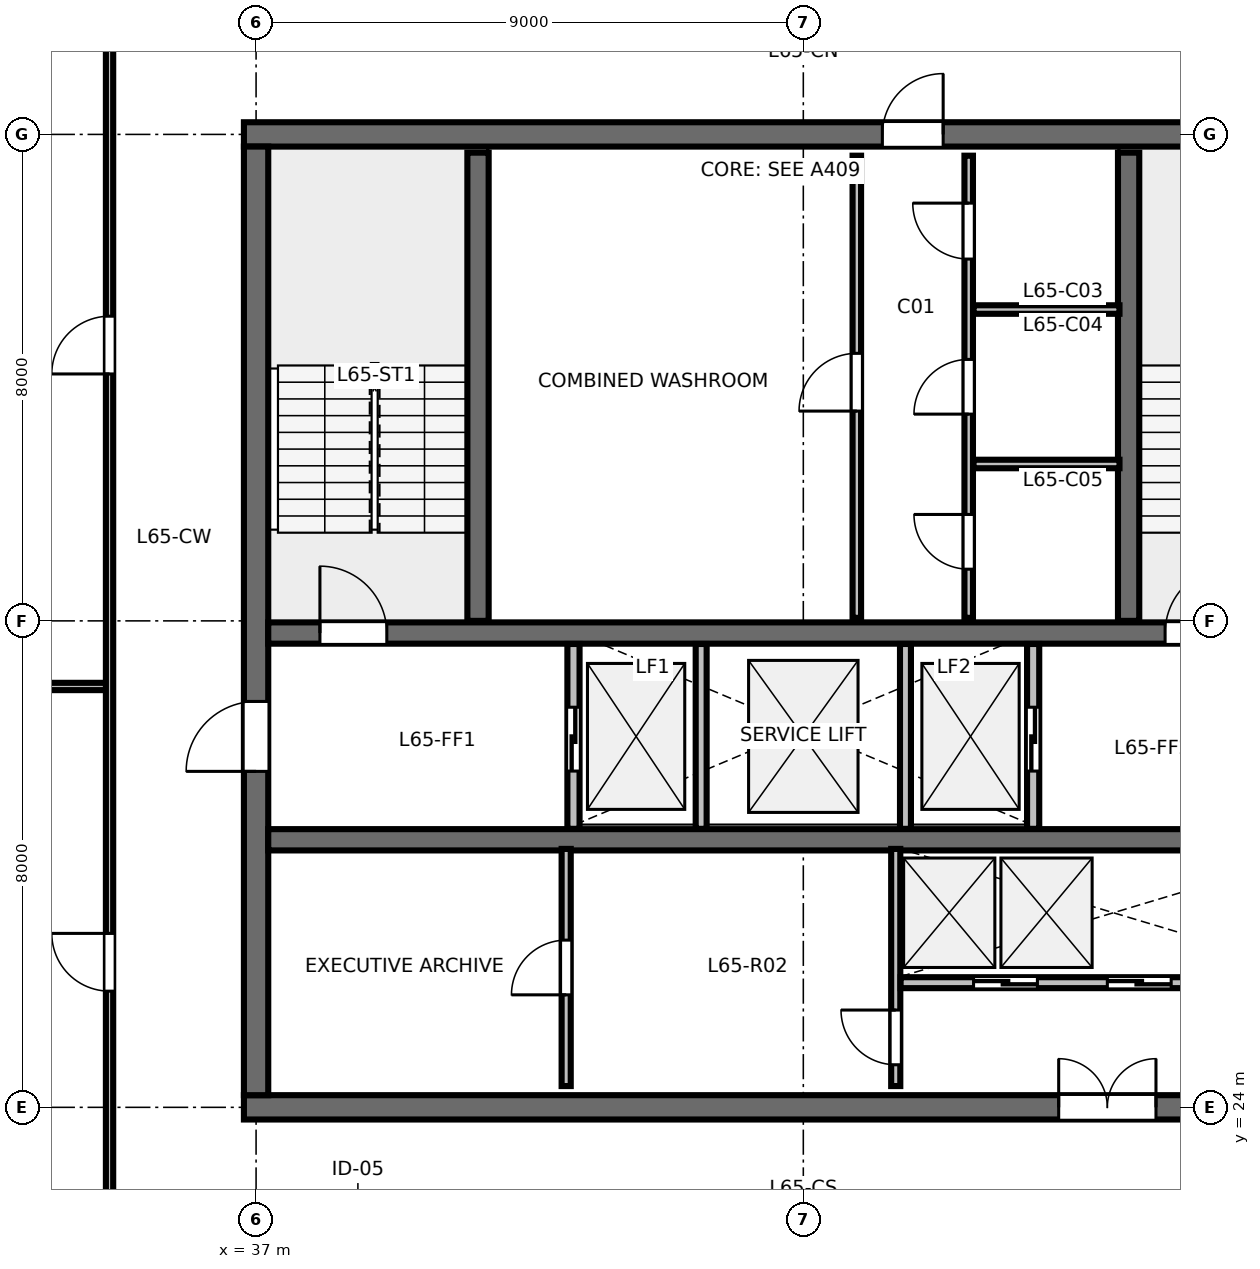
"""IFC4 building model, lengths in metres.
Left out: names, types, materials, properties, quantities, classifications, styles, units other than length and angle.
Written with IfcOpenShell. Run it as: python <this file> out.ifc"""

import sys

from ifc_helpers import new_model, si_unit, direction, frame, frame_2d, origin, place, context, subcontext, project, spatial, rectangle, extrude, element, fill, save


model = new_model("IFC4")
c1 = context("Model", 3, precision=1e-05, world=origin(), true_north=direction((0.0, 1.0)))
c2 = subcontext(c1, "Body", "Model", "MODEL_VIEW")
j1 = project(units=[si_unit("LENGTHUNIT", "METRE"), si_unit("PLANEANGLEUNIT", "RADIAN")], contexts=[c1])
p1 = place(None, origin())
s1 = spatial("IfcSite", under=j1, at=p1, CompositionType="ELEMENT")
p2 = place(p1, origin())
s2 = spatial("IfcBuilding", under=s1, at=p2, CompositionType="ELEMENT")
p3 = place(p2, frame((0.0, 0.0, 246.6)))
s3 = spatial("IfcBuildingStorey", under=s2, at=p3, CompositionType="ELEMENT", Elevation=246.6)
p4 = place(p3, frame((36.8, 24.0, 0.0), z_axis=(0.0, 0.0, 1.0), x_axis=(1.0, 0.0, 0.0)))
e1 = element("IfcWall", 1, at=p4, inside=s3, PredefinedType="SHEAR", context=c2, shape_type="SweptSolid", body=[
    extrude(rectangle(XDim=18.4, YDim=0.4, at=frame_2d((9.2, 0.0))), origin(), (0.0, 0.0, 1.0), 3.36),
])
p5 = place(p4, frame((13.4, 0.0, 0.0)))
e2 = element("IfcOpeningElement", 2, at=p5, cuts=e1, PredefinedType="OPENING", context=c2, shape_type="SweptSolid", body=[
    extrude(rectangle(XDim=1.6, YDim=2.15, at=frame_2d((0.8, 1.075))), frame((0.0, 0.21, 0.0), z_axis=(0.0, -1.0, 0.0), x_axis=(1.0, 0.0, 0.0)), (0.0, 0.0, 1.0), 0.42),
])
p6 = place(p3, frame((36.8, 40.0, 0.0), z_axis=(0.0, 0.0, 1.0), x_axis=(1.0, 0.0, 0.0)))
e3 = element("IfcWall", 3, at=p6, inside=s3, PredefinedType="SHEAR", context=c2, shape_type="SweptSolid", body=[
    extrude(rectangle(XDim=18.4, YDim=0.4, at=frame_2d((9.2, 0.0))), origin(), (0.0, 0.0, 1.0), 3.36),
])
p7 = place(p6, frame((10.5, 0.0, 0.0)))
e4 = element("IfcOpeningElement", 4, at=p7, cuts=e3, PredefinedType="OPENING", context=c2, shape_type="SweptSolid", body=[
    extrude(rectangle(XDim=1.0, YDim=2.15, at=frame_2d((0.5, 1.075))), frame((0.0, 0.21, 0.0), z_axis=(0.0, -1.0, 0.0), x_axis=(1.0, 0.0, 0.0)), (0.0, 0.0, 1.0), 0.42),
])
p8 = place(p3, frame((37.0, 24.2, 0.0), z_axis=(0.0, 0.0, 1.0), x_axis=(0.0, 1.0, 0.0)))
e5 = element("IfcWall", 5, at=p8, inside=s3, PredefinedType="SHEAR", context=c2, shape_type="SweptSolid", body=[
    extrude(rectangle(XDim=15.6, YDim=0.4, at=frame_2d((7.8, 0.0))), origin(), (0.0, 0.0, 1.0), 3.36),
])
p9 = place(p8, frame((5.325, 0.0, 0.0)))
e6 = element("IfcOpeningElement", 6, at=p9, cuts=e5, PredefinedType="OPENING", context=c2, shape_type="SweptSolid", body=[
    extrude(rectangle(XDim=1.15, YDim=2.15, at=frame_2d((0.575, 1.075))), frame((0.0, 0.21, 0.0), z_axis=(0.0, -1.0, 0.0), x_axis=(1.0, 0.0, 0.0)), (0.0, 0.0, 1.0), 0.42),
])
p10 = place(p3, frame((37.2, 31.8, 0.0), z_axis=(0.0, 0.0, 1.0), x_axis=(1.0, 0.0, 0.0)))
e7 = element("IfcWall", 7, at=p10, inside=s3, PredefinedType="SHEAR", context=c2, shape_type="SweptSolid", body=[
    extrude(rectangle(XDim=17.6, YDim=0.35, at=frame_2d((8.8, 0.0))), origin(), (0.0, 0.0, 1.0), 3.36),
])
p11 = place(p10, frame((0.85, 0.0, 0.0)))
e8 = element("IfcOpeningElement", 8, at=p11, cuts=e7, PredefinedType="OPENING", context=c2, shape_type="SweptSolid", body=[
    extrude(rectangle(XDim=1.1, YDim=2.15, at=frame_2d((0.55, 1.075))), frame((0.0, 0.185, 0.0), z_axis=(0.0, -1.0, 0.0), x_axis=(1.0, 0.0, 0.0)), (0.0, 0.0, 1.0), 0.37),
])
p12 = place(p10, frame((14.75, 0.0, 0.0)))
e9 = element("IfcOpeningElement", 9, at=p12, cuts=e7, PredefinedType="OPENING", context=c2, shape_type="SweptSolid", body=[
    extrude(rectangle(XDim=1.1, YDim=2.15, at=frame_2d((0.55, 1.075))), frame((0.0, 0.185, 0.0), z_axis=(0.0, -1.0, 0.0), x_axis=(1.0, 0.0, 0.0)), (0.0, 0.0, 1.0), 0.37),
])
p13 = place(p3, frame((37.2, 28.4, 0.0), z_axis=(0.0, 0.0, 1.0), x_axis=(1.0, 0.0, 0.0)))
e10 = element("IfcWall", 10, at=p13, inside=s3, PredefinedType="SHEAR", context=c2, shape_type="SweptSolid", body=[
    extrude(rectangle(XDim=17.6, YDim=0.35, at=frame_2d((8.8, 0.0))), origin(), (0.0, 0.0, 1.0), 3.36),
])
for number, where, z_axis, x_axis in (
    (11, (40.65, 32.0, 0.0), (0.0, 0.0, 1.0), (0.0, 1.0, 0.0)),
    (12, (51.35, 32.0, 0.0), (0.0, 0.0, 1.0), (0.0, 1.0, 0.0)),
):
    element("IfcWall", number, at=place(p3, frame(where, z_axis=z_axis, x_axis=x_axis)), inside=s3, PredefinedType="SHEAR", context=c2, shape_type="SweptSolid", body=[
        extrude(rectangle(XDim=7.7, YDim=0.35, at=frame_2d((3.85, 0.0))), origin(), (0.0, 0.0, 1.0), 3.6),
    ])
p14 = place(p3, frame((46.88, 32.05, 0.0), z_axis=(0.0, 0.0, 1.0), x_axis=(0.0, 1.0, 0.0)))
e13 = element("IfcWall", 13, at=p14, inside=s3, PredefinedType="PARTITIONING", context=c2, shape_type="SweptSolid", body=[
    extrude(rectangle(XDim=7.6, YDim=0.14, at=frame_2d((3.8, 0.0))), origin(), (0.0, 0.0, 1.0), 3.375),
])
p15 = place(p14, frame((3.4, 0.0, 0.0)))
e14 = element("IfcOpeningElement", 14, at=p15, cuts=e13, PredefinedType="OPENING", context=c2, shape_type="SweptSolid", body=[
    extrude(rectangle(XDim=0.95, YDim=2.15, at=frame_2d((0.475, 1.075))), frame((0.0, 0.08, 0.0), z_axis=(0.0, -1.0, 0.0), x_axis=(1.0, 0.0, 0.0)), (0.0, 0.0, 1.0), 0.16),
])
p16 = place(p3, frame((48.72, 32.05, 0.0), z_axis=(0.0, 0.0, 1.0), x_axis=(0.0, 1.0, 0.0)))
e15 = element("IfcWall", 15, at=p16, inside=s3, PredefinedType="PARTITIONING", context=c2, shape_type="SweptSolid", body=[
    extrude(rectangle(XDim=7.6, YDim=0.14, at=frame_2d((3.8, 0.0))), origin(), (0.0, 0.0, 1.0), 3.375),
])
p17 = place(p16, frame((0.8, 0.0, 0.0)))
e16 = element("IfcOpeningElement", 16, at=p17, cuts=e15, PredefinedType="OPENING", context=c2, shape_type="SweptSolid", body=[
    extrude(rectangle(XDim=0.9, YDim=2.15, at=frame_2d((0.45, 1.075))), frame((0.0, 0.08, 0.0), z_axis=(0.0, -1.0, 0.0), x_axis=(1.0, 0.0, 0.0)), (0.0, 0.0, 1.0), 0.16),
])
p18 = place(p16, frame((3.35, 0.0, 0.0)))
e17 = element("IfcOpeningElement", 17, at=p18, cuts=e15, PredefinedType="OPENING", context=c2, shape_type="SweptSolid", body=[
    extrude(rectangle(XDim=0.9, YDim=2.15, at=frame_2d((0.45, 1.075))), frame((0.0, 0.08, 0.0), z_axis=(0.0, -1.0, 0.0), x_axis=(1.0, 0.0, 0.0)), (0.0, 0.0, 1.0), 0.16),
])
p19 = place(p16, frame((5.9, 0.0, 0.0)))
e18 = element("IfcOpeningElement", 18, at=p19, cuts=e15, PredefinedType="OPENING", context=c2, shape_type="SweptSolid", body=[
    extrude(rectangle(XDim=0.92, YDim=2.15, at=frame_2d((0.46, 1.075))), frame((0.0, 0.08, 0.0), z_axis=(0.0, -1.0, 0.0), x_axis=(1.0, 0.0, 0.0)), (0.0, 0.0, 1.0), 0.16),
])
for number, where, z_axis, x_axis in (
    (19, (48.8, 34.58, 0.0), (0.0, 0.0, 1.0), (1.0, 0.0, 0.0)),
    (20, (48.8, 37.12, 0.0), (0.0, 0.0, 1.0), (1.0, 0.0, 0.0)),
):
    element("IfcWall", number, at=place(p3, frame(where, z_axis=z_axis, x_axis=x_axis)), inside=s3, PredefinedType="PARTITIONING", context=c2, shape_type="SweptSolid", body=[
        extrude(rectangle(XDim=2.4, YDim=0.14, at=frame_2d((1.2, 0.0))), origin(), (0.0, 0.0, 1.0), 3.375),
    ])
p20 = place(p3, frame((42.22, 28.58, 0.0), z_axis=(0.0, 0.0, 1.0), x_axis=(0.0, 1.0, 0.0)))
e21 = element("IfcWall", 21, at=p20, inside=s3, PredefinedType="PARTITIONING", context=c2, shape_type="SweptSolid", body=[
    extrude(rectangle(XDim=3.04, YDim=0.2, at=frame_2d((1.52, 0.0))), origin(), (0.0, 0.0, 1.0), 3.375),
])
p21 = place(p20, frame((0.95, 0.0, 0.0)))
e22 = element("IfcOpeningElement", 22, at=p21, cuts=e21, PredefinedType="OPENING", context=c2, shape_type="SweptSolid", body=[
    extrude(rectangle(XDim=1.05, YDim=2.15, at=frame_2d((0.525, 1.075))), frame((0.0, 0.11, 0.0), z_axis=(0.0, -1.0, 0.0), x_axis=(1.0, 0.0, 0.0)), (0.0, 0.0, 1.0), 0.22),
])
p22 = place(p3, frame((49.78, 28.58, 0.0), z_axis=(0.0, 0.0, 1.0), x_axis=(0.0, 1.0, 0.0)))
e23 = element("IfcWall", 23, at=p22, inside=s3, PredefinedType="PARTITIONING", context=c2, shape_type="SweptSolid", body=[
    extrude(rectangle(XDim=3.04, YDim=0.2, at=frame_2d((1.52, 0.0))), origin(), (0.0, 0.0, 1.0), 3.375),
])
p23 = place(p22, frame((0.95, 0.0, 0.0)))
e24 = element("IfcOpeningElement", 24, at=p23, cuts=e23, PredefinedType="OPENING", context=c2, shape_type="SweptSolid", body=[
    extrude(rectangle(XDim=1.05, YDim=2.15, at=frame_2d((0.525, 1.075))), frame((0.0, 0.11, 0.0), z_axis=(0.0, -1.0, 0.0), x_axis=(1.0, 0.0, 0.0)), (0.0, 0.0, 1.0), 0.22),
])
for number, where, z_axis, x_axis in (
    (25, (44.32, 28.58, 0.0), (0.0, 0.0, 1.0), (0.0, 1.0, 0.0)),
    (26, (47.68, 28.58, 0.0), (0.0, 0.0, 1.0), (0.0, 1.0, 0.0)),
):
    element("IfcWall", number, at=place(p3, frame(where, z_axis=z_axis, x_axis=x_axis)), inside=s3, PredefinedType="PARTITIONING", context=c2, shape_type="SweptSolid", body=[
        extrude(rectangle(XDim=3.04, YDim=0.18, at=frame_2d((1.52, 0.0))), origin(), (0.0, 0.0, 1.0), 3.375),
    ])
p24 = place(p3, frame((42.1, 24.35, 0.0), z_axis=(0.0, 0.0, 1.0), x_axis=(0.0, 1.0, 0.0)))
e27 = element("IfcWall", 27, at=p24, inside=s3, PredefinedType="PARTITIONING", context=c2, shape_type="SweptSolid", body=[
    extrude(rectangle(XDim=3.9, YDim=0.15, at=frame_2d((1.95, 0.0))), origin(), (0.0, 0.0, 1.0), 3.375),
])
p25 = place(p24, frame((1.5, 0.0, 0.0)))
e28 = element("IfcOpeningElement", 28, at=p25, cuts=e27, PredefinedType="OPENING", context=c2, shape_type="SweptSolid", body=[
    extrude(rectangle(XDim=0.9, YDim=2.15, at=frame_2d((0.45, 1.075))), frame((0.0, 0.085, 0.0), z_axis=(0.0, -1.0, 0.0), x_axis=(1.0, 0.0, 0.0)), (0.0, 0.0, 1.0), 0.17),
])
p26 = place(p3, frame((47.52, 24.35, 0.0), z_axis=(0.0, 0.0, 1.0), x_axis=(0.0, 1.0, 0.0)))
e29 = element("IfcWall", 29, at=p26, inside=s3, PredefinedType="PARTITIONING", context=c2, shape_type="SweptSolid", body=[
    extrude(rectangle(XDim=3.9, YDim=0.15, at=frame_2d((1.95, 0.0))), origin(), (0.0, 0.0, 1.0), 3.375),
])
p27 = place(p26, frame((0.35, 0.0, 0.0)))
e30 = element("IfcOpeningElement", 30, at=p27, cuts=e29, PredefinedType="OPENING", context=c2, shape_type="SweptSolid", body=[
    extrude(rectangle(XDim=0.9, YDim=2.15, at=frame_2d((0.45, 1.075))), frame((0.0, 0.085, 0.0), z_axis=(0.0, -1.0, 0.0), x_axis=(1.0, 0.0, 0.0)), (0.0, 0.0, 1.0), 0.17),
])
p28 = place(p3, frame((47.6, 26.05, 0.0), z_axis=(0.0, 0.0, 1.0), x_axis=(1.0, 0.0, 0.0)))
e31 = element("IfcWall", 31, at=p28, inside=s3, PredefinedType="PARTITIONING", context=c2, shape_type="SweptSolid", body=[
    extrude(rectangle(XDim=7.0, YDim=0.18, at=frame_2d((3.5, 0.0))), origin(), (0.0, 0.0, 1.0), 3.375),
])
p29 = place(p28, frame((1.2, 0.0, 0.0)))
e32 = element("IfcOpeningElement", 32, at=p29, cuts=e31, PredefinedType="OPENING", context=c2, shape_type="SweptSolid", body=[
    extrude(rectangle(XDim=1.05, YDim=2.15, at=frame_2d((0.525, 1.075))), frame((0.0, 0.1, 0.0), z_axis=(0.0, -1.0, 0.0), x_axis=(1.0, 0.0, 0.0)), (0.0, 0.0, 1.0), 0.2),
])
p30 = place(p28, frame((3.4, 0.0, 0.0)))
e33 = element("IfcOpeningElement", 33, at=p30, cuts=e31, PredefinedType="OPENING", context=c2, shape_type="SweptSolid", body=[
    extrude(rectangle(XDim=1.05, YDim=2.15, at=frame_2d((0.525, 1.075))), frame((0.0, 0.1, 0.0), z_axis=(0.0, -1.0, 0.0), x_axis=(1.0, 0.0, 0.0)), (0.0, 0.0, 1.0), 0.2),
])
p31 = place(p3, frame((34.59, 30.921, 0.0), z_axis=(0.0, 0.0, 1.0), x_axis=(-1.0, 0.0, 0.0)))
e34 = element("IfcWall", 34, at=p31, inside=s3, PredefinedType="PARTITIONING", context=c2, shape_type="SweptSolid", body=[
    extrude(rectangle(XDim=7.16, YDim=0.12, at=frame_2d((3.58, 0.0))), origin(), (0.0, 0.0, 1.0), 2.655),
])
p32 = place(p31, frame((1.4, 0.0, 0.0)))
e35 = element("IfcOpeningElement", 35, at=p32, cuts=e34, PredefinedType="OPENING", context=c2, shape_type="SweptSolid", body=[
    extrude(rectangle(XDim=0.9, YDim=2.15, at=frame_2d((0.45, 1.075))), frame((0.0, 0.07, 0.0), z_axis=(0.0, -1.0, 0.0), x_axis=(1.0, 0.0, 0.0)), (0.0, 0.0, 1.0), 0.14),
])
p33 = place(p3, frame((34.59, 21.65, 0.0), z_axis=(0.0, 0.0, 1.0), x_axis=(0.0, 1.0, 0.0)))
e36 = element("IfcWall", 36, at=p33, inside=s3, PredefinedType="PARTITIONING", context=c2, shape_type="SweptSolid", body=[
    extrude(rectangle(XDim=20.7, YDim=0.12, at=frame_2d((10.35, 0.0))), origin(), (0.0, 0.0, 1.0), 2.655),
])
p34 = place(p33, frame((4.26, 0.0, 0.0)))
e37 = element("IfcOpeningElement", 37, at=p34, cuts=e36, PredefinedType="OPENING", context=c2, shape_type="SweptSolid", body=[
    extrude(rectangle(XDim=0.95, YDim=2.15, at=frame_2d((0.475, 1.075))), frame((0.0, 0.07, 0.0), z_axis=(0.0, -1.0, 0.0), x_axis=(1.0, 0.0, 0.0)), (0.0, 0.0, 1.0), 0.14),
])
p35 = place(p33, frame((14.411, 0.0, 0.0)))
e38 = element("IfcOpeningElement", 38, at=p35, cuts=e36, PredefinedType="OPENING", context=c2, shape_type="SweptSolid", body=[
    extrude(rectangle(XDim=0.95, YDim=2.15, at=frame_2d((0.475, 1.075))), frame((0.0, 0.07, 0.0), z_axis=(0.0, -1.0, 0.0), x_axis=(1.0, 0.0, 0.0)), (0.0, 0.0, 1.0), 0.14),
])
p36 = place(p11, origin())
e39 = element("IfcDoor", 39, at=p36, inside=s3, OperationType="SINGLE_SWING_LEFT", PredefinedType="DOOR", context=c2, shape_type="SweptSolid", body=[
    extrude(rectangle(XDim=1.1, YDim=2.15, at=frame_2d((0.55, 1.075))), frame((0.0, 0.025, 0.0), z_axis=(0.0, -1.0, 0.0), x_axis=(1.0, 0.0, 0.0)), (0.0, 0.0, 1.0), 0.05),
])
fill(e8, e39)
p37 = place(p12, origin())
e40 = element("IfcDoor", 40, at=p37, inside=s3, OperationType="SINGLE_SWING_RIGHT", PredefinedType="DOOR", context=c2, shape_type="SweptSolid", body=[
    extrude(rectangle(XDim=1.1, YDim=2.15, at=frame_2d((0.55, 1.075))), frame((0.0, 0.025, 0.0), z_axis=(0.0, -1.0, 0.0), x_axis=(1.0, 0.0, 0.0)), (0.0, 0.0, 1.0), 0.05),
])
fill(e9, e40)
p38 = place(p7, origin())
e41 = element("IfcDoor", 41, at=p38, inside=s3, OperationType="SINGLE_SWING_RIGHT", PredefinedType="DOOR", context=c2, shape_type="SweptSolid", body=[
    extrude(rectangle(XDim=1.0, YDim=2.15, at=frame_2d((0.5, 1.075))), frame((0.0, 0.025, 0.0), z_axis=(0.0, -1.0, 0.0), x_axis=(1.0, 0.0, 0.0)), (0.0, 0.0, 1.0), 0.05),
])
fill(e4, e41)
p39 = place(p9, origin())
e42 = element("IfcDoor", 42, at=p39, inside=s3, OperationType="SINGLE_SWING_LEFT", PredefinedType="DOOR", context=c2, shape_type="SweptSolid", body=[
    extrude(rectangle(XDim=1.15, YDim=2.15, at=frame_2d((0.575, 1.075))), frame((0.0, 0.025, 0.0), z_axis=(0.0, -1.0, 0.0), x_axis=(1.0, 0.0, 0.0)), (0.0, 0.0, 1.0), 0.05),
])
fill(e6, e42)
p40 = place(p5, origin())
e43 = element("IfcDoor", 43, at=p40, inside=s3, OperationType="DOUBLE_DOOR_SINGLE_SWING", PredefinedType="DOOR", context=c2, shape_type="SweptSolid", body=[
    extrude(rectangle(XDim=1.6, YDim=2.15, at=frame_2d((0.8, 1.075))), frame((0.0, 0.025, 0.0), z_axis=(0.0, -1.0, 0.0), x_axis=(1.0, 0.0, 0.0)), (0.0, 0.0, 1.0), 0.05),
])
fill(e2, e43)
p41 = place(p15, origin())
e44 = element("IfcDoor", 44, at=p41, inside=s3, OperationType="SINGLE_SWING_LEFT", PredefinedType="DOOR", context=c2, shape_type="SweptSolid", body=[
    extrude(rectangle(XDim=0.95, YDim=2.15, at=frame_2d((0.475, 1.075))), frame((0.0, 0.025, 0.0), z_axis=(0.0, -1.0, 0.0), x_axis=(1.0, 0.0, 0.0)), (0.0, 0.0, 1.0), 0.05),
])
fill(e14, e44)
p42 = place(p17, origin())
e45 = element("IfcDoor", 45, at=p42, inside=s3, OperationType="SINGLE_SWING_RIGHT", PredefinedType="DOOR", context=c2, shape_type="SweptSolid", body=[
    extrude(rectangle(XDim=0.9, YDim=2.15, at=frame_2d((0.45, 1.075))), frame((0.0, 0.025, 0.0), z_axis=(0.0, -1.0, 0.0), x_axis=(1.0, 0.0, 0.0)), (0.0, 0.0, 1.0), 0.05),
])
fill(e16, e45)
p43 = place(p18, origin())
e46 = element("IfcDoor", 46, at=p43, inside=s3, OperationType="SINGLE_SWING_LEFT", PredefinedType="DOOR", context=c2, shape_type="SweptSolid", body=[
    extrude(rectangle(XDim=0.9, YDim=2.15, at=frame_2d((0.45, 1.075))), frame((0.0, 0.025, 0.0), z_axis=(0.0, -1.0, 0.0), x_axis=(1.0, 0.0, 0.0)), (0.0, 0.0, 1.0), 0.05),
])
fill(e17, e46)
p44 = place(p19, origin())
e47 = element("IfcDoor", 47, at=p44, inside=s3, OperationType="SINGLE_SWING_RIGHT", PredefinedType="DOOR", context=c2, shape_type="SweptSolid", body=[
    extrude(rectangle(XDim=0.92, YDim=2.15, at=frame_2d((0.46, 1.075))), frame((0.0, 0.025, 0.0), z_axis=(0.0, -1.0, 0.0), x_axis=(1.0, 0.0, 0.0)), (0.0, 0.0, 1.0), 0.05),
])
fill(e18, e47)
p45 = place(p21, origin())
e48 = element("IfcDoor", 48, at=p45, inside=s3, OperationType="SLIDING_TO_LEFT", PredefinedType="DOOR", context=c2, shape_type="SweptSolid", body=[
    extrude(rectangle(XDim=1.05, YDim=2.15, at=frame_2d((0.525, 1.075))), frame((0.0, 0.025, 0.0), z_axis=(0.0, -1.0, 0.0), x_axis=(1.0, 0.0, 0.0)), (0.0, 0.0, 1.0), 0.05),
])
fill(e22, e48)
p46 = place(p23, origin())
e49 = element("IfcDoor", 49, at=p46, inside=s3, OperationType="SLIDING_TO_RIGHT", PredefinedType="DOOR", context=c2, shape_type="SweptSolid", body=[
    extrude(rectangle(XDim=1.05, YDim=2.15, at=frame_2d((0.525, 1.075))), frame((0.0, 0.025, 0.0), z_axis=(0.0, -1.0, 0.0), x_axis=(1.0, 0.0, 0.0)), (0.0, 0.0, 1.0), 0.05),
])
fill(e24, e49)
p47 = place(p25, origin())
e50 = element("IfcDoor", 50, at=p47, inside=s3, OperationType="SINGLE_SWING_LEFT", PredefinedType="DOOR", context=c2, shape_type="SweptSolid", body=[
    extrude(rectangle(XDim=0.9, YDim=2.15, at=frame_2d((0.45, 1.075))), frame((0.0, 0.025, 0.0), z_axis=(0.0, -1.0, 0.0), x_axis=(1.0, 0.0, 0.0)), (0.0, 0.0, 1.0), 0.05),
])
fill(e28, e50)
p48 = place(p27, origin())
e51 = element("IfcDoor", 51, at=p48, inside=s3, OperationType="SINGLE_SWING_RIGHT", PredefinedType="DOOR", context=c2, shape_type="SweptSolid", body=[
    extrude(rectangle(XDim=0.9, YDim=2.15, at=frame_2d((0.45, 1.075))), frame((0.0, 0.025, 0.0), z_axis=(0.0, -1.0, 0.0), x_axis=(1.0, 0.0, 0.0)), (0.0, 0.0, 1.0), 0.05),
])
fill(e30, e51)
p49 = place(p29, origin())
e52 = element("IfcDoor", 52, at=p49, inside=s3, OperationType="SLIDING_TO_LEFT", PredefinedType="DOOR", context=c2, shape_type="SweptSolid", body=[
    extrude(rectangle(XDim=1.05, YDim=2.15, at=frame_2d((0.525, 1.075))), frame((0.0, 0.025, 0.0), z_axis=(0.0, -1.0, 0.0), x_axis=(1.0, 0.0, 0.0)), (0.0, 0.0, 1.0), 0.05),
])
fill(e32, e52)
p50 = place(p30, origin())
e53 = element("IfcDoor", 53, at=p50, inside=s3, OperationType="SLIDING_TO_RIGHT", PredefinedType="DOOR", context=c2, shape_type="SweptSolid", body=[
    extrude(rectangle(XDim=1.05, YDim=2.15, at=frame_2d((0.525, 1.075))), frame((0.0, 0.025, 0.0), z_axis=(0.0, -1.0, 0.0), x_axis=(1.0, 0.0, 0.0)), (0.0, 0.0, 1.0), 0.05),
])
fill(e33, e53)
p51 = place(p34, origin())
e54 = element("IfcDoor", 54, at=p51, inside=s3, OperationType="SINGLE_SWING_RIGHT", PredefinedType="DOOR", context=c2, shape_type="SweptSolid", body=[
    extrude(rectangle(XDim=0.95, YDim=2.15, at=frame_2d((0.475, 1.075))), frame((0.0, 0.025, 0.0), z_axis=(0.0, -1.0, 0.0), x_axis=(1.0, 0.0, 0.0)), (0.0, 0.0, 1.0), 0.05),
])
fill(e37, e54)
p52 = place(p35, origin())
e55 = element("IfcDoor", 55, at=p52, inside=s3, OperationType="SINGLE_SWING_LEFT", PredefinedType="DOOR", context=c2, shape_type="SweptSolid", body=[
    extrude(rectangle(XDim=0.95, YDim=2.15, at=frame_2d((0.475, 1.075))), frame((0.0, 0.025, 0.0), z_axis=(0.0, -1.0, 0.0), x_axis=(1.0, 0.0, 0.0)), (0.0, 0.0, 1.0), 0.05),
])
fill(e38, e55)
save(model, sys.argv[1])
